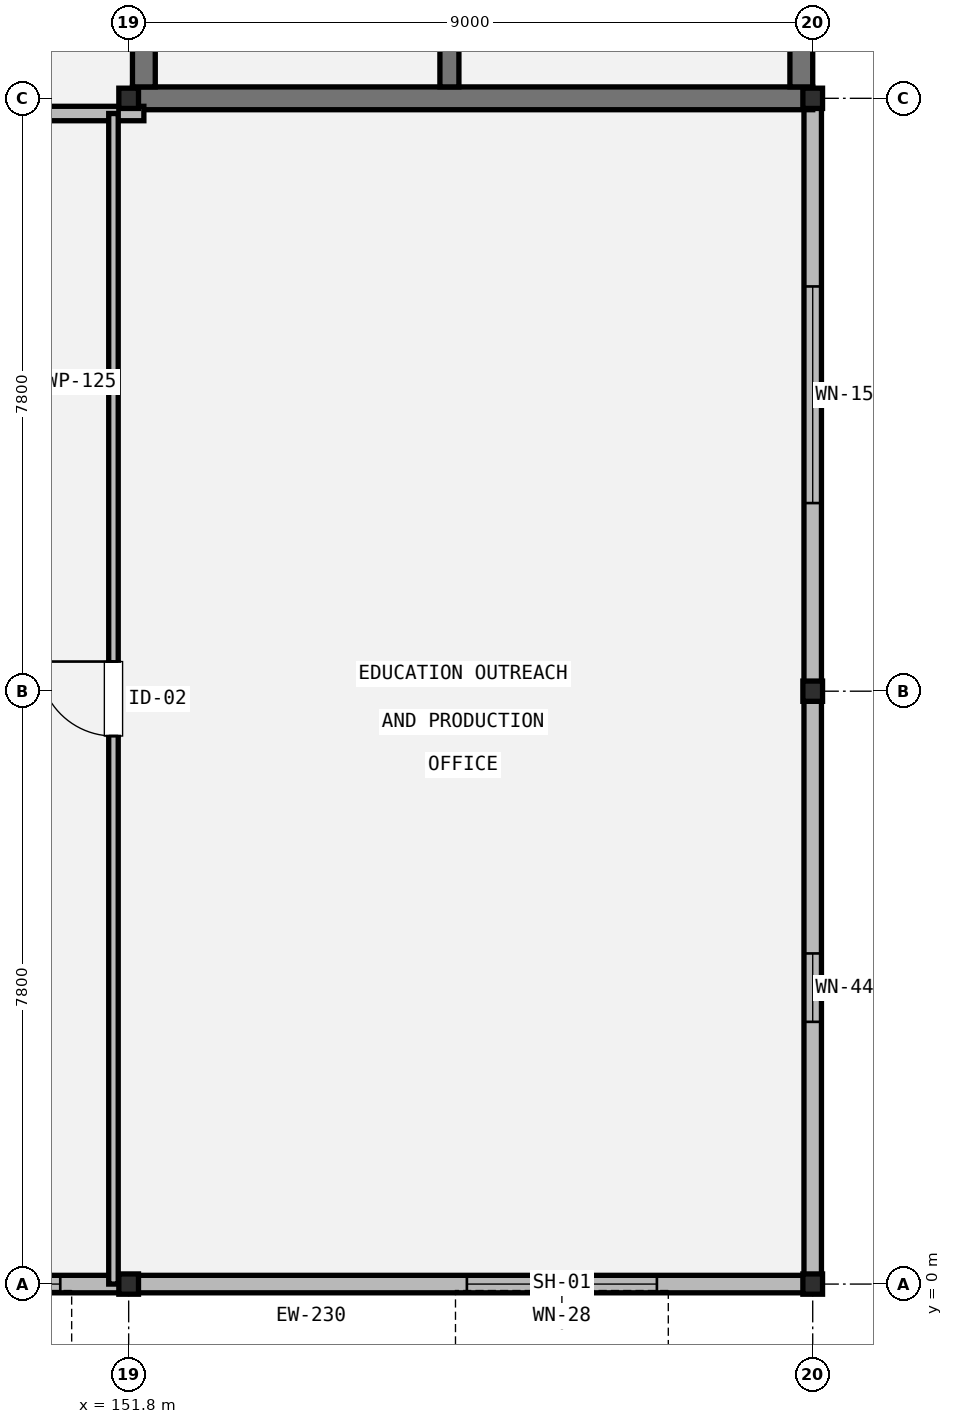
"""IFC4 building model, lengths in metres.
Left out: names, types, materials, properties, quantities, classifications, styles, units other than length and angle.
Written with IfcOpenShell. Run it as: python <this file> out.ifc"""

import sys

from ifc_helpers import new_model, si_unit, direction, frame, frame_2d, origin, origin_2d, place, context, subcontext, project, spatial, rectangle, i_section, extrude, element, fill, save


model = new_model("IFC4")
c1 = context("Model", 3, precision=1e-05, world=origin(), true_north=direction((0.0, 1.0)))
c2 = subcontext(c1, "Body", "Model", "MODEL_VIEW")
j1 = project(units=[si_unit("LENGTHUNIT", "METRE"), si_unit("PLANEANGLEUNIT", "RADIAN")], contexts=[c1])
p1 = place(None, origin())
s1 = spatial("IfcSite", under=j1, at=p1, CompositionType="ELEMENT")
p2 = place(p1, origin())
s2 = spatial("IfcBuilding", under=s1, at=p2, CompositionType="ELEMENT")
p3 = place(p2, frame((0.0, 0.0, 15.0)))
s3 = spatial("IfcBuildingStorey", under=s2, at=p3, CompositionType="ELEMENT", Elevation=15.0)
for number, where, z_axis, x_axis in (
    (1, (151.8, 0.0, 0.0), (0.0, 0.0, 1.0), (1.0, 0.0, 0.0)),
    (2, (151.8, 15.6, 0.0), (0.0, 0.0, 1.0), (1.0, 0.0, 0.0)),
    (3, (160.8, 0.0, 0.0), (0.0, 0.0, 1.0), (1.0, 0.0, 0.0)),
    (4, (160.8, 7.8, 0.0), (0.0, 0.0, 1.0), (1.0, 0.0, 0.0)),
    (5, (160.8, 15.6, 0.0), (0.0, 0.0, 1.0), (1.0, 0.0, 0.0)),
):
    element("IfcColumn", number, at=place(p3, frame(where, z_axis=z_axis, x_axis=x_axis)), inside=s3, PredefinedType="COLUMN", context=c2, shape_type="SweptSolid", body=[
        extrude(i_section(OverallWidth=0.259, OverallDepth=0.267, WebThickness=0.013, FlangeThickness=0.021, FilletRadius=0.013, at=origin_2d()), origin(), (0.0, 0.0, 1.0), 4.2),
    ])
p4 = place(p3, frame((160.8, 0.0, 0.0), z_axis=(0.0, 0.0, 1.0), x_axis=(-1.0, 0.0, 0.0)))
e6 = element("IfcWall", 6, at=p4, inside=s3, PredefinedType="STANDARD", context=c2, shape_type="SweptSolid", body=[
    extrude(rectangle(XDim=13.2, YDim=0.23, at=frame_2d((6.6, 0.0))), origin(), (0.0, 0.0, 1.0), 3.952),
])
p5 = place(p4, frame((2.05, 0.0, 0.9)))
e7 = element("IfcOpeningElement", 7, at=p5, cuts=e6, PredefinedType="OPENING", context=c2, shape_type="SweptSolid", body=[
    extrude(rectangle(XDim=2.5, YDim=1.95, at=frame_2d((1.25, 0.975))), frame((0.0, 0.125, 0.0), z_axis=(0.0, -1.0, 0.0), x_axis=(1.0, 0.0, 0.0)), (0.0, 0.0, 1.0), 0.25),
])
p6 = place(p4, frame((9.9, 0.0, 0.9)))
e8 = element("IfcOpeningElement", 8, at=p6, cuts=e6, PredefinedType="OPENING", context=c2, shape_type="SweptSolid", body=[
    extrude(rectangle(XDim=2.7, YDim=1.95, at=frame_2d((1.35, 0.975))), frame((0.0, 0.125, 0.0), z_axis=(0.0, -1.0, 0.0), x_axis=(1.0, 0.0, 0.0)), (0.0, 0.0, 1.0), 0.25),
])
p7 = place(p3, frame((160.8, 15.6, 0.0), z_axis=(0.0, 0.0, 1.0), x_axis=(0.0, -1.0, 0.0)))
e9 = element("IfcWall", 9, at=p7, inside=s3, PredefinedType="STANDARD", context=c2, shape_type="SweptSolid", body=[
    extrude(rectangle(XDim=15.6, YDim=0.23, at=frame_2d((7.8, 0.0))), origin(), (0.0, 0.0, 1.0), 3.952),
])
p8 = place(p7, frame((2.475, 0.0, 0.9)))
e10 = element("IfcOpeningElement", 10, at=p8, cuts=e9, PredefinedType="OPENING", context=c2, shape_type="SweptSolid", body=[
    extrude(rectangle(XDim=2.85, YDim=2.1, at=frame_2d((1.425, 1.05))), frame((0.0, 0.125, 0.0), z_axis=(0.0, -1.0, 0.0), x_axis=(1.0, 0.0, 0.0)), (0.0, 0.0, 1.0), 0.25),
])
p9 = place(p7, frame((11.25, 0.0, 0.9)))
e11 = element("IfcOpeningElement", 11, at=p9, cuts=e9, PredefinedType="OPENING", context=c2, shape_type="SweptSolid", body=[
    extrude(rectangle(XDim=0.9, YDim=1.35, at=frame_2d((0.45, 0.675))), frame((0.0, 0.125, 0.0), z_axis=(0.0, -1.0, 0.0), x_axis=(1.0, 0.0, 0.0)), (0.0, 0.0, 1.0), 0.25),
])
p10 = place(p3, frame((160.8, 15.6, 0.0), z_axis=(0.0, 0.0, 1.0), x_axis=(-1.0, 0.0, 0.0)))
e12 = element("IfcWall", 12, at=p10, inside=s3, PredefinedType="SHEAR", context=c2, shape_type="SweptSolid", body=[
    extrude(rectangle(XDim=8.95, YDim=0.3, at=frame_2d((4.475, 0.0))), origin(), (0.0, 0.0, 1.0), 4.0),
])
for number, where, z_axis, x_axis in (
    (13, (152.0, 15.75, 0.0), (0.0, 0.0, 1.0), (0.0, 1.0, 0.0)),
    (14, (160.65, 26.05, 0.0), (0.0, 0.0, 1.0), (0.0, -1.0, 0.0)),
):
    element("IfcWall", number, at=place(p3, frame(where, z_axis=z_axis, x_axis=x_axis)), inside=s3, PredefinedType="SHEAR", context=c2, shape_type="SweptSolid", body=[
        extrude(rectangle(XDim=10.3, YDim=0.3, at=frame_2d((5.15, 0.0))), origin(), (0.0, 0.0, 1.0), 4.0),
    ])
p11 = place(p3, frame((156.02, 26.05, 0.0), z_axis=(0.0, 0.0, 1.0), x_axis=(0.0, -1.0, 0.0)))
e15 = element("IfcWall", 15, at=p11, inside=s3, PredefinedType="SHEAR", context=c2, shape_type="SweptSolid", body=[
    extrude(rectangle(XDim=10.3, YDim=0.25, at=frame_2d((5.15, 0.0))), origin(), (0.0, 0.0, 1.0), 4.0),
])
p12 = place(p11, frame((8.65, 0.0, 0.0)))
e16 = element("IfcOpeningElement", 16, at=p12, cuts=e15, PredefinedType="OPENING", context=c2, shape_type="SweptSolid", body=[
    extrude(rectangle(XDim=1.1, YDim=2.15, at=frame_2d((0.55, 1.075))), frame((0.0, 0.135, 0.0), z_axis=(0.0, -1.0, 0.0), x_axis=(1.0, 0.0, 0.0)), (0.0, 0.0, 1.0), 0.27),
])
p13 = place(p3, frame((134.4, 15.4, 0.0), z_axis=(0.0, 0.0, 1.0), x_axis=(1.0, 0.0, 0.0)))
e17 = element("IfcWall", 17, at=p13, inside=s3, PredefinedType="PARTITIONING", context=c2, shape_type="SweptSolid", body=[
    extrude(rectangle(XDim=17.6, YDim=0.19, at=frame_2d((8.8, 0.0))), origin(), (0.0, 0.0, 1.0), 3.952),
])
p14 = place(p13, frame((8.0, 0.0, 0.0)))
e18 = element("IfcOpeningElement", 18, at=p14, cuts=e17, PredefinedType="OPENING", context=c2, shape_type="SweptSolid", body=[
    extrude(rectangle(XDim=1.6, YDim=2.25, at=frame_2d((0.8, 1.125))), frame((0.0, 0.105, 0.0), z_axis=(0.0, -1.0, 0.0), x_axis=(1.0, 0.0, 0.0)), (0.0, 0.0, 1.0), 0.21),
])
p15 = place(p3, frame((151.6, 0.0, 0.0), z_axis=(0.0, 0.0, 1.0), x_axis=(0.0, 1.0, 0.0)))
e19 = element("IfcWall", 19, at=p15, inside=s3, PredefinedType="PARTITIONING", context=c2, shape_type="SweptSolid", body=[
    extrude(rectangle(XDim=15.4, YDim=0.125, at=frame_2d((7.7, 0.0))), origin(), (0.0, 0.0, 1.0), 3.952),
])
p16 = place(p15, frame((7.21, 0.0, 0.0)))
e20 = element("IfcOpeningElement", 20, at=p16, cuts=e19, PredefinedType="OPENING", context=c2, shape_type="SweptSolid", body=[
    extrude(rectangle(XDim=0.98, YDim=2.1, at=frame_2d((0.49, 1.05))), frame((0.0, 0.073, 0.0), z_axis=(0.0, -1.0, 0.0), x_axis=(1.0, 0.0, 0.0)), (0.0, 0.0, 1.0), 0.145),
])
p17 = place(p5, origin())
e21 = element("IfcWindow", 21, at=p17, inside=s3, PartitioningType="SINGLE_PANEL", PredefinedType="WINDOW", context=c2, shape_type="SweptSolid", body=[
    extrude(rectangle(XDim=2.5, YDim=1.95, at=frame_2d((1.25, 0.975))), frame((0.0, 0.03, 0.0), z_axis=(0.0, -1.0, 0.0), x_axis=(1.0, 0.0, 0.0)), (0.0, 0.0, 1.0), 0.06),
])
fill(e7, e21)
p18 = place(p6, origin())
e22 = element("IfcWindow", 22, at=p18, inside=s3, PartitioningType="SINGLE_PANEL", PredefinedType="WINDOW", context=c2, shape_type="SweptSolid", body=[
    extrude(rectangle(XDim=2.7, YDim=1.95, at=frame_2d((1.35, 0.975))), frame((0.0, 0.03, 0.0), z_axis=(0.0, -1.0, 0.0), x_axis=(1.0, 0.0, 0.0)), (0.0, 0.0, 1.0), 0.06),
])
fill(e8, e22)
p19 = place(p8, origin())
e23 = element("IfcWindow", 23, at=p19, inside=s3, PartitioningType="SINGLE_PANEL", PredefinedType="WINDOW", context=c2, shape_type="SweptSolid", body=[
    extrude(rectangle(XDim=2.85, YDim=2.1, at=frame_2d((1.425, 1.05))), frame((0.0, 0.03, 0.0), z_axis=(0.0, -1.0, 0.0), x_axis=(1.0, 0.0, 0.0)), (0.0, 0.0, 1.0), 0.06),
])
fill(e10, e23)
p20 = place(p9, origin())
e24 = element("IfcWindow", 24, at=p20, inside=s3, PartitioningType="SINGLE_PANEL", PredefinedType="WINDOW", context=c2, shape_type="SweptSolid", body=[
    extrude(rectangle(XDim=0.9, YDim=1.35, at=frame_2d((0.45, 0.675))), frame((0.0, 0.03, 0.0), z_axis=(0.0, -1.0, 0.0), x_axis=(1.0, 0.0, 0.0)), (0.0, 0.0, 1.0), 0.06),
])
fill(e11, e24)
p21 = place(p16, origin())
e25 = element("IfcDoor", 25, at=p21, inside=s3, OperationType="SINGLE_SWING_RIGHT", PredefinedType="DOOR", context=c2, shape_type="SweptSolid", body=[
    extrude(rectangle(XDim=0.98, YDim=2.1, at=frame_2d((0.49, 1.05))), frame((0.0, 0.025, 0.0), z_axis=(0.0, -1.0, 0.0), x_axis=(1.0, 0.0, 0.0)), (0.0, 0.0, 1.0), 0.05),
])
fill(e20, e25)
save(model, sys.argv[1])
